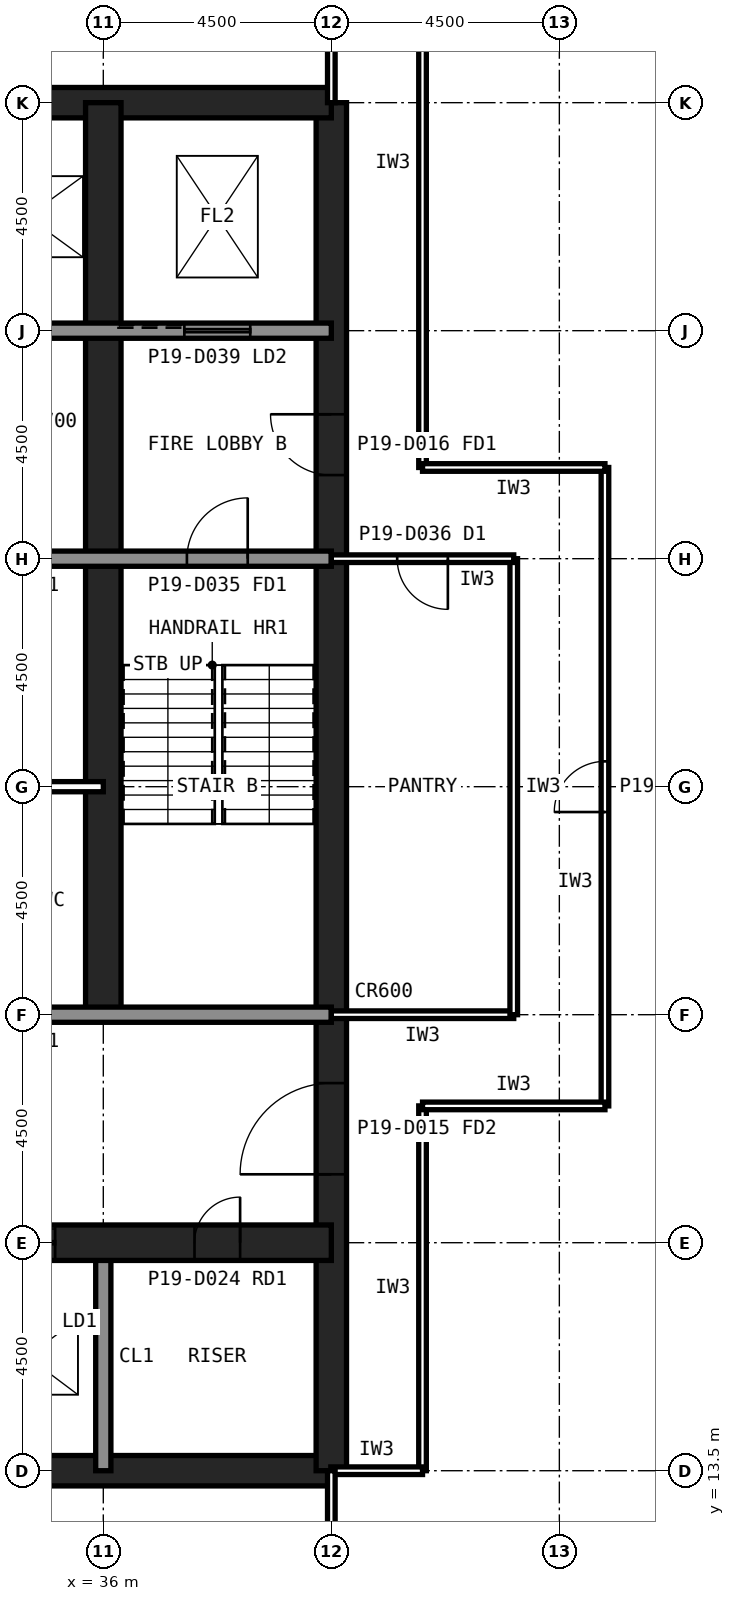
"""IFC4 building model, lengths in metres.
Left out: names, types, materials, properties, quantities, classifications, styles, units other than length and angle.
Written with IfcOpenShell. Run it as: python <this file> out.ifc"""

import sys

from ifc_helpers import new_model, si_unit, direction, frame, frame_2d, origin, place, context, subcontext, project, spatial, rectangle, extrude, element, fill, save


model = new_model("IFC4")
c1 = context("Model", 3, precision=1e-05, world=origin(), true_north=direction((0.0, 1.0)))
c2 = subcontext(c1, "Body", "Model", "MODEL_VIEW")
j1 = project(units=[si_unit("LENGTHUNIT", "METRE"), si_unit("PLANEANGLEUNIT", "RADIAN")], contexts=[c1])
p1 = place(None, origin())
s1 = spatial("IfcSite", under=j1, at=p1, CompositionType="ELEMENT")
p2 = place(p1, origin())
s2 = spatial("IfcBuilding", under=s1, at=p2, CompositionType="ELEMENT")
p3 = place(p2, frame((0.0, 0.0, 79.4)))
s3 = spatial("IfcBuildingStorey", under=s2, at=p3, CompositionType="ELEMENT", Elevation=79.4)
p4 = place(p3, frame((13.5, 13.5, 0.0), z_axis=(0.0, 0.0, 1.0), x_axis=(1.0, 0.0, 0.0)))
e1 = element("IfcWall", 1, at=p4, inside=s3, PredefinedType="SHEAR", context=c2, shape_type="SweptSolid", body=[
    extrude(rectangle(XDim=27.0, YDim=0.6, at=frame_2d((13.5, 0.0))), origin(), (0.0, 0.0, 1.0), 4.2),
])
p5 = place(p3, frame((40.5, 13.5, 0.0), z_axis=(0.0, 0.0, 1.0), x_axis=(0.0, 1.0, 0.0)))
e2 = element("IfcWall", 2, at=p5, inside=s3, PredefinedType="SHEAR", context=c2, shape_type="SweptSolid", body=[
    extrude(rectangle(XDim=27.0, YDim=0.6, at=frame_2d((13.5, 0.0))), origin(), (0.0, 0.0, 1.0), 4.2),
])
p6 = place(p5, frame((5.85, 0.0, 0.0)))
e3 = element("IfcOpeningElement", 3, at=p6, cuts=e2, PredefinedType="OPENING", context=c2, shape_type="SweptSolid", body=[
    extrude(rectangle(XDim=1.8, YDim=2.1, at=frame_2d((0.9, 1.05))), frame((0.0, 0.31, 0.0), z_axis=(0.0, -1.0, 0.0), x_axis=(1.0, 0.0, 0.0)), (0.0, 0.0, 1.0), 0.62),
])
p7 = place(p5, frame((19.65, 0.0, 0.0)))
e4 = element("IfcOpeningElement", 4, at=p7, cuts=e2, PredefinedType="OPENING", context=c2, shape_type="SweptSolid", body=[
    extrude(rectangle(XDim=1.2, YDim=2.1, at=frame_2d((0.6, 1.05))), frame((0.0, 0.31, 0.0), z_axis=(0.0, -1.0, 0.0), x_axis=(1.0, 0.0, 0.0)), (0.0, 0.0, 1.0), 0.62),
])
p8 = place(p3, frame((40.5, 40.5, 0.0), z_axis=(0.0, 0.0, 1.0), x_axis=(-1.0, 0.0, 0.0)))
e5 = element("IfcWall", 5, at=p8, inside=s3, PredefinedType="SHEAR", context=c2, shape_type="SweptSolid", body=[
    extrude(rectangle(XDim=27.0, YDim=0.6, at=frame_2d((13.5, 0.0))), origin(), (0.0, 0.0, 1.0), 4.2),
])
p9 = place(p3, frame((36.0, 13.5, 0.0), z_axis=(0.0, 0.0, 1.0), x_axis=(0.0, 1.0, 0.0)))
e6 = element("IfcWall", 6, at=p9, inside=s3, PredefinedType="SOLIDWALL", context=c2, shape_type="SweptSolid", body=[
    extrude(rectangle(XDim=4.5, YDim=0.3, at=frame_2d((2.25, 0.0))), origin(), (0.0, 0.0, 1.0), 4.04),
])
p10 = place(p3, frame((36.0, 22.5, 0.0), z_axis=(0.0, 0.0, 1.0), x_axis=(0.0, 1.0, 0.0)))
e7 = element("IfcWall", 7, at=p10, inside=s3, PredefinedType="SHEAR", context=c2, shape_type="SweptSolid", body=[
    extrude(rectangle(XDim=18.0, YDim=0.7, at=frame_2d((9.0, 0.0))), origin(), (0.0, 0.0, 1.0), 4.2),
])
p11 = place(p3, frame((13.5, 18.0, 0.0), z_axis=(0.0, 0.0, 1.0), x_axis=(1.0, 0.0, 0.0)))
e8 = element("IfcWall", 8, at=p11, inside=s3, PredefinedType="SHEAR", context=c2, shape_type="SweptSolid", body=[
    extrude(rectangle(XDim=27.0, YDim=0.7, at=frame_2d((13.5, 0.0))), origin(), (0.0, 0.0, 1.0), 4.2),
])
p12 = place(p11, frame((24.3, 0.0, 0.0)))
e9 = element("IfcOpeningElement", 9, at=p12, cuts=e8, PredefinedType="OPENING", context=c2, shape_type="SweptSolid", body=[
    extrude(rectangle(XDim=0.9, YDim=2.1, at=frame_2d((0.45, 1.05))), frame((0.0, 0.36, 0.0), z_axis=(0.0, -1.0, 0.0), x_axis=(1.0, 0.0, 0.0)), (0.0, 0.0, 1.0), 0.72),
])
p13 = place(p11, frame((5.45, 0.0, 0.0)))
e10 = element("IfcOpeningElement", 10, at=p13, cuts=e8, PredefinedType="OPENING", context=c2, shape_type="SweptSolid", body=[
    extrude(rectangle(XDim=1.1, YDim=2.1, at=frame_2d((0.55, 1.05))), frame((0.0, 0.36, 0.0), z_axis=(0.0, -1.0, 0.0), x_axis=(1.0, 0.0, 0.0)), (0.0, 0.0, 1.0), 0.72),
])
p14 = place(p11, frame((8.45, 0.0, 0.0)))
e11 = element("IfcOpeningElement", 11, at=p14, cuts=e8, PredefinedType="OPENING", context=c2, shape_type="SweptSolid", body=[
    extrude(rectangle(XDim=1.1, YDim=2.1, at=frame_2d((0.55, 1.05))), frame((0.0, 0.36, 0.0), z_axis=(0.0, -1.0, 0.0), x_axis=(1.0, 0.0, 0.0)), (0.0, 0.0, 1.0), 0.72),
])
p15 = place(p11, frame((11.45, 0.0, 0.0)))
e12 = element("IfcOpeningElement", 12, at=p15, cuts=e8, PredefinedType="OPENING", context=c2, shape_type="SweptSolid", body=[
    extrude(rectangle(XDim=1.1, YDim=2.1, at=frame_2d((0.55, 1.05))), frame((0.0, 0.36, 0.0), z_axis=(0.0, -1.0, 0.0), x_axis=(1.0, 0.0, 0.0)), (0.0, 0.0, 1.0), 0.72),
])
p16 = place(p11, frame((14.45, 0.0, 0.0)))
e13 = element("IfcOpeningElement", 13, at=p16, cuts=e8, PredefinedType="OPENING", context=c2, shape_type="SweptSolid", body=[
    extrude(rectangle(XDim=1.1, YDim=2.1, at=frame_2d((0.55, 1.05))), frame((0.0, 0.36, 0.0), z_axis=(0.0, -1.0, 0.0), x_axis=(1.0, 0.0, 0.0)), (0.0, 0.0, 1.0), 0.72),
])
p17 = place(p11, frame((17.45, 0.0, 0.0)))
e14 = element("IfcOpeningElement", 14, at=p17, cuts=e8, PredefinedType="OPENING", context=c2, shape_type="SweptSolid", body=[
    extrude(rectangle(XDim=1.1, YDim=2.1, at=frame_2d((0.55, 1.05))), frame((0.0, 0.36, 0.0), z_axis=(0.0, -1.0, 0.0), x_axis=(1.0, 0.0, 0.0)), (0.0, 0.0, 1.0), 0.72),
])
p18 = place(p11, frame((20.45, 0.0, 0.0)))
e15 = element("IfcOpeningElement", 15, at=p18, cuts=e8, PredefinedType="OPENING", context=c2, shape_type="SweptSolid", body=[
    extrude(rectangle(XDim=1.1, YDim=2.1, at=frame_2d((0.55, 1.05))), frame((0.0, 0.36, 0.0), z_axis=(0.0, -1.0, 0.0), x_axis=(1.0, 0.0, 0.0)), (0.0, 0.0, 1.0), 0.72),
])
p19 = place(p11, frame((1.6, 0.0, 0.0)))
e16 = element("IfcOpeningElement", 16, at=p19, cuts=e8, PredefinedType="OPENING", context=c2, shape_type="SweptSolid", body=[
    extrude(rectangle(XDim=1.3, YDim=2.2, at=frame_2d((0.65, 1.1))), frame((0.0, 0.36, 0.0), z_axis=(0.0, -1.0, 0.0), x_axis=(1.0, 0.0, 0.0)), (0.0, 0.0, 1.0), 0.72),
])
p20 = place(p3, frame((13.5, 36.0, 0.0), z_axis=(0.0, 0.0, 1.0), x_axis=(1.0, 0.0, 0.0)))
e17 = element("IfcWall", 17, at=p20, inside=s3, PredefinedType="SOLIDWALL", context=c2, shape_type="SweptSolid", body=[
    extrude(rectangle(XDim=27.0, YDim=0.3, at=frame_2d((13.5, 0.0))), origin(), (0.0, 0.0, 1.0), 4.04),
])
p21 = place(p20, frame((1.8, 0.0, 0.0)))
e18 = element("IfcOpeningElement", 18, at=p21, cuts=e17, PredefinedType="OPENING", context=c2, shape_type="SweptSolid", body=[
    extrude(rectangle(XDim=0.9, YDim=2.1, at=frame_2d((0.45, 1.05))), frame((0.0, 0.16, 0.0), z_axis=(0.0, -1.0, 0.0), x_axis=(1.0, 0.0, 0.0)), (0.0, 0.0, 1.0), 0.32),
])
p22 = place(p20, frame((24.1, 0.0, 0.0)))
e19 = element("IfcOpeningElement", 19, at=p22, cuts=e17, PredefinedType="OPENING", context=c2, shape_type="SweptSolid", body=[
    extrude(rectangle(XDim=1.3, YDim=2.2, at=frame_2d((0.65, 1.1))), frame((0.0, 0.16, 0.0), z_axis=(0.0, -1.0, 0.0), x_axis=(1.0, 0.0, 0.0)), (0.0, 0.0, 1.0), 0.32),
])
p23 = place(p3, frame((13.5, 22.5, 0.0), z_axis=(0.0, 0.0, 1.0), x_axis=(1.0, 0.0, 0.0)))
e20 = element("IfcWall", 20, at=p23, inside=s3, PredefinedType="SOLIDWALL", context=c2, shape_type="SweptSolid", body=[
    extrude(rectangle(XDim=27.0, YDim=0.3, at=frame_2d((13.5, 0.0))), origin(), (0.0, 0.0, 1.0), 4.04),
])
p24 = place(p23, frame((1.65, 0.0, 0.0)))
e21 = element("IfcOpeningElement", 21, at=p24, cuts=e20, PredefinedType="OPENING", context=c2, shape_type="SweptSolid", body=[
    extrude(rectangle(XDim=1.2, YDim=2.1, at=frame_2d((0.6, 1.05))), frame((0.0, 0.16, 0.0), z_axis=(0.0, -1.0, 0.0), x_axis=(1.0, 0.0, 0.0)), (0.0, 0.0, 1.0), 0.32),
])
p25 = place(p23, frame((6.025, 0.0, 0.0)))
e22 = element("IfcOpeningElement", 22, at=p25, cuts=e20, PredefinedType="OPENING", context=c2, shape_type="SweptSolid", body=[
    extrude(rectangle(XDim=1.0, YDim=2.1, at=frame_2d((0.5, 1.05))), frame((0.0, 0.16, 0.0), z_axis=(0.0, -1.0, 0.0), x_axis=(1.0, 0.0, 0.0)), (0.0, 0.0, 1.0), 0.32),
])
p26 = place(p23, frame((10.525, 0.0, 0.0)))
e23 = element("IfcOpeningElement", 23, at=p26, cuts=e20, PredefinedType="OPENING", context=c2, shape_type="SweptSolid", body=[
    extrude(rectangle(XDim=1.0, YDim=2.1, at=frame_2d((0.5, 1.05))), frame((0.0, 0.16, 0.0), z_axis=(0.0, -1.0, 0.0), x_axis=(1.0, 0.0, 0.0)), (0.0, 0.0, 1.0), 0.32),
])
p27 = place(p23, frame((19.75, 0.0, 0.0)))
e24 = element("IfcOpeningElement", 24, at=p27, cuts=e20, PredefinedType="OPENING", context=c2, shape_type="SweptSolid", body=[
    extrude(rectangle(XDim=1.0, YDim=2.1, at=frame_2d((0.5, 1.05))), frame((0.0, 0.16, 0.0), z_axis=(0.0, -1.0, 0.0), x_axis=(1.0, 0.0, 0.0)), (0.0, 0.0, 1.0), 0.32),
])
p28 = place(p23, frame((15.05, 0.0, 0.0)))
e25 = element("IfcOpeningElement", 25, at=p28, cuts=e20, PredefinedType="OPENING", context=c2, shape_type="SweptSolid", body=[
    extrude(rectangle(XDim=1.4, YDim=2.4, at=frame_2d((0.7, 1.2))), frame((0.0, 0.16, 0.0), z_axis=(0.0, -1.0, 0.0), x_axis=(1.0, 0.0, 0.0)), (0.0, 0.0, 1.0), 0.32),
])
p29 = place(p3, frame((13.5, 31.5, 0.0), z_axis=(0.0, 0.0, 1.0), x_axis=(1.0, 0.0, 0.0)))
e26 = element("IfcWall", 26, at=p29, inside=s3, PredefinedType="SOLIDWALL", context=c2, shape_type="SweptSolid", body=[
    extrude(rectangle(XDim=27.0, YDim=0.3, at=frame_2d((13.5, 0.0))), origin(), (0.0, 0.0, 1.0), 4.04),
])
p30 = place(p29, frame((24.15, 0.0, 0.0)))
e27 = element("IfcOpeningElement", 27, at=p30, cuts=e26, PredefinedType="OPENING", context=c2, shape_type="SweptSolid", body=[
    extrude(rectangle(XDim=1.2, YDim=2.1, at=frame_2d((0.6, 1.05))), frame((0.0, 0.16, 0.0), z_axis=(0.0, -1.0, 0.0), x_axis=(1.0, 0.0, 0.0)), (0.0, 0.0, 1.0), 0.32),
])
p31 = place(p29, frame((15.3, 0.0, 0.0)))
e28 = element("IfcOpeningElement", 28, at=p31, cuts=e26, PredefinedType="OPENING", context=c2, shape_type="SweptSolid", body=[
    extrude(rectangle(XDim=0.9, YDim=2.1, at=frame_2d((0.45, 1.05))), frame((0.0, 0.16, 0.0), z_axis=(0.0, -1.0, 0.0), x_axis=(1.0, 0.0, 0.0)), (0.0, 0.0, 1.0), 0.32),
])
p32 = place(p29, frame((19.8, 0.0, 0.0)))
e29 = element("IfcOpeningElement", 29, at=p32, cuts=e26, PredefinedType="OPENING", context=c2, shape_type="SweptSolid", body=[
    extrude(rectangle(XDim=0.9, YDim=2.1, at=frame_2d((0.45, 1.05))), frame((0.0, 0.16, 0.0), z_axis=(0.0, -1.0, 0.0), x_axis=(1.0, 0.0, 0.0)), (0.0, 0.0, 1.0), 0.32),
])
p33 = place(p3, frame((27.0, 27.0, 0.0), z_axis=(0.0, 0.0, 1.0), x_axis=(1.0, 0.0, 0.0)))
e30 = element("IfcWall", 30, at=p33, inside=s3, PredefinedType="PARTITIONING", context=c2, shape_type="SweptSolid", body=[
    extrude(rectangle(XDim=9.0, YDim=0.2, at=frame_2d((4.5, 0.0))), origin(), (0.0, 0.0, 1.0), 4.04),
])
p34 = place(p3, frame((18.0, 33.3, 0.0), z_axis=(0.0, 0.0, 1.0), x_axis=(1.0, 0.0, 0.0)))
e31 = element("IfcWall", 31, at=p34, inside=s3, PredefinedType="PARTITIONING", context=c2, shape_type="SweptSolid", body=[
    extrude(rectangle(XDim=18.0, YDim=0.15, at=frame_2d((9.0, 0.0))), origin(), (0.0, 0.0, 1.0), 4.04),
])
p35 = place(p34, frame((5.55, 0.0, 0.0)))
e32 = element("IfcOpeningElement", 32, at=p35, cuts=e31, PredefinedType="OPENING", context=c2, shape_type="SweptSolid", body=[
    extrude(rectangle(XDim=0.9, YDim=2.1, at=frame_2d((0.45, 1.05))), frame((0.0, 0.085, 0.0), z_axis=(0.0, -1.0, 0.0), x_axis=(1.0, 0.0, 0.0)), (0.0, 0.0, 1.0), 0.17),
])
p36 = place(p34, frame((14.55, 0.0, 0.0)))
e33 = element("IfcOpeningElement", 33, at=p36, cuts=e31, PredefinedType="OPENING", context=c2, shape_type="SweptSolid", body=[
    extrude(rectangle(XDim=0.9, YDim=2.1, at=frame_2d((0.45, 1.05))), frame((0.0, 0.085, 0.0), z_axis=(0.0, -1.0, 0.0), x_axis=(1.0, 0.0, 0.0)), (0.0, 0.0, 1.0), 0.17),
])
p37 = place(p3, frame((45.9, 20.7, 0.0), z_axis=(0.0, 0.0, 1.0), x_axis=(0.0, 1.0, 0.0)))
e34 = element("IfcWall", 34, at=p37, inside=s3, PredefinedType="PARTITIONING", context=c2, shape_type="SweptSolid", body=[
    extrude(rectangle(XDim=12.6, YDim=0.15, at=frame_2d((6.3, 0.0))), origin(), (0.0, 0.0, 1.0), 4.04),
])
p38 = place(p37, frame((5.8, 0.0, 0.0)))
e35 = element("IfcOpeningElement", 35, at=p38, cuts=e34, PredefinedType="OPENING", context=c2, shape_type="SweptSolid", body=[
    extrude(rectangle(XDim=1.0, YDim=2.1, at=frame_2d((0.5, 1.05))), frame((0.0, 0.085, 0.0), z_axis=(0.0, -1.0, 0.0), x_axis=(1.0, 0.0, 0.0)), (0.0, 0.0, 1.0), 0.17),
])
for number, where, z_axis, x_axis in (
    (36, (42.3, 13.5, 0.0), (0.0, 0.0, 1.0), (0.0, 1.0, 0.0)),
    (37, (42.3, 33.3, 0.0), (0.0, 0.0, 1.0), (0.0, 1.0, 0.0)),
):
    element("IfcWall", number, at=place(p3, frame(where, z_axis=z_axis, x_axis=x_axis)), inside=s3, PredefinedType="PARTITIONING", context=c2, shape_type="SweptSolid", body=[
        extrude(rectangle(XDim=7.2, YDim=0.15, at=frame_2d((3.6, 0.0))), origin(), (0.0, 0.0, 1.0), 4.04),
    ])
for number, where, z_axis, x_axis in (
    (38, (42.3, 20.7, 0.0), (0.0, 0.0, 1.0), (1.0, 0.0, 0.0)),
    (39, (45.9, 33.3, 0.0), (0.0, 0.0, 1.0), (-1.0, 0.0, 0.0)),
):
    element("IfcWall", number, at=place(p3, frame(where, z_axis=z_axis, x_axis=x_axis)), inside=s3, PredefinedType="PARTITIONING", context=c2, shape_type="SweptSolid", body=[
        extrude(rectangle(XDim=3.6, YDim=0.15, at=frame_2d((1.8, 0.0))), origin(), (0.0, 0.0, 1.0), 4.04),
    ])
p39 = place(p3, frame((40.49, 13.5, 0.0), z_axis=(0.0, 0.0, 1.0), x_axis=(1.0, 0.0, 0.0)))
e40 = element("IfcWall", 40, at=p39, inside=s3, PredefinedType="PARTITIONING", context=c2, shape_type="SweptSolid", body=[
    extrude(rectangle(XDim=1.81, YDim=0.15, at=frame_2d((0.905, 0.0))), origin(), (0.0, 0.0, 1.0), 3.189),
])
p40 = place(p3, frame((42.3, 40.5, 0.0), z_axis=(0.0, 0.0, 1.0), x_axis=(-1.0, 0.0, 0.0)))
e41 = element("IfcWall", 41, at=p40, inside=s3, PredefinedType="PARTITIONING", context=c2, shape_type="SweptSolid", body=[
    extrude(rectangle(XDim=1.8, YDim=0.15, at=frame_2d((0.9, 0.0))), origin(), (0.0, 0.0, 1.0), 3.189),
])
p41 = place(p3, frame((40.5, 22.5, 0.0), z_axis=(0.0, 0.0, 1.0), x_axis=(1.0, 0.0, 0.0)))
e42 = element("IfcWall", 42, at=p41, inside=s3, PredefinedType="PARTITIONING", context=c2, shape_type="SweptSolid", body=[
    extrude(rectangle(XDim=3.6, YDim=0.15, at=frame_2d((1.8, 0.0))), origin(), (0.0, 0.0, 1.0), 3.189),
])
p42 = place(p3, frame((44.1, 22.5, 0.0), z_axis=(0.0, 0.0, 1.0), x_axis=(0.0, 1.0, 0.0)))
e43 = element("IfcWall", 43, at=p42, inside=s3, PredefinedType="PARTITIONING", context=c2, shape_type="SweptSolid", body=[
    extrude(rectangle(XDim=9.0, YDim=0.15, at=frame_2d((4.5, 0.0))), origin(), (0.0, 0.0, 1.0), 4.04),
])
p43 = place(p3, frame((44.1, 31.5, 0.0), z_axis=(0.0, 0.0, 1.0), x_axis=(-1.0, 0.0, 0.0)))
e44 = element("IfcWall", 44, at=p43, inside=s3, PredefinedType="PARTITIONING", context=c2, shape_type="SweptSolid", body=[
    extrude(rectangle(XDim=3.6, YDim=0.15, at=frame_2d((1.8, 0.0))), origin(), (0.0, 0.0, 1.0), 3.189),
])
p44 = place(p43, frame((1.3, 0.0, 0.0)))
e45 = element("IfcOpeningElement", 45, at=p44, cuts=e44, PredefinedType="OPENING", context=c2, shape_type="SweptSolid", body=[
    extrude(rectangle(XDim=1.0, YDim=2.1, at=frame_2d((0.5, 1.05))), frame((0.0, 0.085, 0.0), z_axis=(0.0, -1.0, 0.0), x_axis=(1.0, 0.0, 0.0)), (0.0, 0.0, 1.0), 0.17),
])
p45 = place(p3, frame((40.5, 40.5, 0.0), z_axis=(0.0, 0.0, 1.0), x_axis=(0.0, 1.0, 0.0)))
e46 = element("IfcWall", 46, at=p45, inside=s3, PredefinedType="PARTITIONING", context=c2, shape_type="SweptSolid", body=[
    extrude(rectangle(XDim=3.0, YDim=0.15, at=frame_2d((1.5, 0.0))), origin(), (0.0, 0.0, 1.0), 3.189),
])
p46 = place(p3, frame((40.5, 5.4, 0.0), z_axis=(0.0, 0.0, 1.0), x_axis=(0.0, 1.0, 0.0)))
e47 = element("IfcWall", 47, at=p46, inside=s3, PredefinedType="PARTITIONING", context=c2, shape_type="SweptSolid", body=[
    extrude(rectangle(XDim=8.1, YDim=0.15, at=frame_2d((4.05, 0.0))), origin(), (0.0, 0.0, 1.0), 3.189),
])
p47 = place(p46, frame((3.55, 0.0, 0.0)))
e48 = element("IfcOpeningElement", 48, at=p47, cuts=e47, PredefinedType="OPENING", context=c2, shape_type="SweptSolid", body=[
    extrude(rectangle(XDim=1.0, YDim=2.1, at=frame_2d((0.5, 1.05))), frame((0.0, 0.085, 0.0), z_axis=(0.0, -1.0, 0.0), x_axis=(1.0, 0.0, 0.0)), (0.0, 0.0, 1.0), 0.17),
])
p48 = place(p6, origin())
e49 = element("IfcDoor", 49, at=p48, inside=s3, OperationType="SINGLE_SWING_LEFT", PredefinedType="DOOR", context=c2, shape_type="SweptSolid", body=[
    extrude(rectangle(XDim=1.8, YDim=2.1, at=frame_2d((0.9, 1.05))), frame((0.0, 0.025, 0.0), z_axis=(0.0, -1.0, 0.0), x_axis=(1.0, 0.0, 0.0)), (0.0, 0.0, 1.0), 0.05),
])
fill(e3, e49)
p49 = place(p7, origin())
e50 = element("IfcDoor", 50, at=p49, inside=s3, OperationType="SINGLE_SWING_RIGHT", PredefinedType="DOOR", context=c2, shape_type="SweptSolid", body=[
    extrude(rectangle(XDim=1.2, YDim=2.1, at=frame_2d((0.6, 1.05))), frame((0.0, 0.025, 0.0), z_axis=(0.0, -1.0, 0.0), x_axis=(1.0, 0.0, 0.0)), (0.0, 0.0, 1.0), 0.05),
])
fill(e4, e50)
p50 = place(p30, origin())
e51 = element("IfcDoor", 51, at=p50, inside=s3, OperationType="SINGLE_SWING_RIGHT", PredefinedType="DOOR", context=c2, shape_type="SweptSolid", body=[
    extrude(rectangle(XDim=1.2, YDim=2.1, at=frame_2d((0.6, 1.05))), frame((0.0, 0.025, 0.0), z_axis=(0.0, -1.0, 0.0), x_axis=(1.0, 0.0, 0.0)), (0.0, 0.0, 1.0), 0.05),
])
fill(e27, e51)
p51 = place(p12, origin())
e52 = element("IfcDoor", 52, at=p51, inside=s3, OperationType="SINGLE_SWING_RIGHT", PredefinedType="DOOR", context=c2, shape_type="SweptSolid", body=[
    extrude(rectangle(XDim=0.9, YDim=2.1, at=frame_2d((0.45, 1.05))), frame((0.0, 0.025, 0.0), z_axis=(0.0, -1.0, 0.0), x_axis=(1.0, 0.0, 0.0)), (0.0, 0.0, 1.0), 0.05),
])
fill(e9, e52)
p52 = place(p18, origin())
e53 = element("IfcDoor", 53, at=p52, inside=s3, OperationType="SLIDING_TO_LEFT", PredefinedType="DOOR", context=c2, shape_type="SweptSolid", body=[
    extrude(rectangle(XDim=1.1, YDim=2.1, at=frame_2d((0.55, 1.05))), frame((0.0, 0.025, 0.0), z_axis=(0.0, -1.0, 0.0), x_axis=(1.0, 0.0, 0.0)), (0.0, 0.0, 1.0), 0.05),
])
fill(e15, e53)
p53 = place(p22, origin())
e54 = element("IfcDoor", 54, at=p53, inside=s3, OperationType="SLIDING_TO_LEFT", PredefinedType="DOOR", context=c2, shape_type="SweptSolid", body=[
    extrude(rectangle(XDim=1.3, YDim=2.2, at=frame_2d((0.65, 1.1))), frame((0.0, 0.025, 0.0), z_axis=(0.0, -1.0, 0.0), x_axis=(1.0, 0.0, 0.0)), (0.0, 0.0, 1.0), 0.05),
])
fill(e19, e54)
p54 = place(p38, origin())
e55 = element("IfcDoor", 55, at=p54, inside=s3, OperationType="SINGLE_SWING_LEFT", PredefinedType="DOOR", context=c2, shape_type="SweptSolid", body=[
    extrude(rectangle(XDim=1.0, YDim=2.1, at=frame_2d((0.5, 1.05))), frame((0.0, 0.025, 0.0), z_axis=(0.0, -1.0, 0.0), x_axis=(1.0, 0.0, 0.0)), (0.0, 0.0, 1.0), 0.05),
])
fill(e35, e55)
p55 = place(p44, origin())
e56 = element("IfcDoor", 56, at=p55, inside=s3, OperationType="SINGLE_SWING_LEFT", PredefinedType="DOOR", context=c2, shape_type="SweptSolid", body=[
    extrude(rectangle(XDim=1.0, YDim=2.1, at=frame_2d((0.5, 1.05))), frame((0.0, 0.025, 0.0), z_axis=(0.0, -1.0, 0.0), x_axis=(1.0, 0.0, 0.0)), (0.0, 0.0, 1.0), 0.05),
])
fill(e45, e56)
save(model, sys.argv[1])
